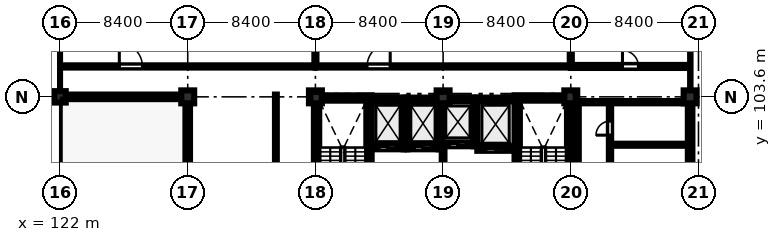
"""IFC4 building model, lengths in metres.
Left out: names, types, materials, properties, quantities, classifications, styles, units other than length and angle.
Written with IfcOpenShell. Run it as: python <this file> out.ifc"""

import sys

from ifc_helpers import new_model, si_unit, direction, frame, frame_2d, origin, origin_2d, place, context, subcontext, project, spatial, rectangle, extrude, element, fill, save


model = new_model("IFC4")
c1 = context("Model", 3, precision=1e-05, world=origin(), true_north=direction((0.0, 1.0)))
c2 = subcontext(c1, "Body", "Model", "MODEL_VIEW")
j1 = project(units=[si_unit("LENGTHUNIT", "METRE"), si_unit("PLANEANGLEUNIT", "RADIAN")], contexts=[c1])
p1 = place(None, origin())
s1 = spatial("IfcSite", under=j1, at=p1, CompositionType="ELEMENT")
p2 = place(p1, origin())
s2 = spatial("IfcBuilding", under=s1, at=p2, CompositionType="ELEMENT")
p3 = place(p2, frame((0.0, 0.0, 27.6)))
s3 = spatial("IfcBuildingStorey", under=s2, at=p3, CompositionType="ELEMENT", Elevation=27.6)
p4 = place(p3, frame((122.0, 103.6, 0.0), z_axis=(0.0, 0.0, 1.0), x_axis=(1.0, 0.0, 0.0)))
e1 = element("IfcColumn", 1, at=p4, inside=s3, PredefinedType="COLUMN", context=c2, shape_type="SweptSolid", body=[
    extrude(rectangle(XDim=0.75, YDim=0.75, at=origin_2d()), origin(), (0.0, 0.0, 1.0), 4.02),
])
for number, where, z_axis, x_axis in (
    (2, (130.4, 103.6, 0.0), (0.0, 0.0, 1.0), (1.0, 0.0, 0.0)),
    (3, (138.8, 103.6, 0.0), (0.0, 0.0, 1.0), (1.0, 0.0, 0.0)),
    (4, (147.2, 103.6, 0.0), (0.0, 0.0, 1.0), (1.0, 0.0, 0.0)),
    (5, (155.6, 103.6, 0.0), (0.0, 0.0, 1.0), (1.0, 0.0, 0.0)),
    (6, (163.45, 103.6, 0.0), (0.0, 0.0, 1.0), (1.0, 0.0, 0.0)),
):
    element("IfcColumn", number, at=place(p3, frame(where, z_axis=z_axis, x_axis=x_axis)), inside=s3, PredefinedType="COLUMN", context=c2, shape_type="SweptSolid", body=[
        extrude(rectangle(XDim=0.85, YDim=0.85, at=origin_2d()), origin(), (0.0, 0.0, 1.0), 4.02),
    ])
p5 = place(p3, frame((138.7, 103.525, 0.0), z_axis=(0.0, 0.0, 1.0), x_axis=(1.0, 0.0, 0.0)))
e7 = element("IfcWall", 7, at=p5, inside=s3, PredefinedType="SHEAR", context=c2, shape_type="SweptSolid", body=[
    extrude(rectangle(XDim=3.8, YDim=0.35, at=frame_2d((1.9, 0.0))), origin(), (0.0, 0.0, 1.0), 4.02),
])
p6 = place(p3, frame((138.875, 95.45, 0.0), z_axis=(0.0, 0.0, 1.0), x_axis=(0.0, 1.0, 0.0)))
e8 = element("IfcWall", 8, at=p6, inside=s3, PredefinedType="SHEAR", context=c2, shape_type="SweptSolid", body=[
    extrude(rectangle(XDim=7.9, YDim=0.35, at=frame_2d((3.95, 0.0))), origin(), (0.0, 0.0, 1.0), 4.02),
])
p7 = place(p3, frame((142.325, 95.45, 0.0), z_axis=(0.0, 0.0, 1.0), x_axis=(0.0, 1.0, 0.0)))
e9 = element("IfcWall", 9, at=p7, inside=s3, PredefinedType="SHEAR", context=c2, shape_type="SweptSolid", body=[
    extrude(rectangle(XDim=7.9, YDim=0.35, at=frame_2d((3.95, 0.0))), origin(), (0.0, 0.0, 1.0), 4.02),
])
p8 = place(p7, frame((0.22, 0.0, 0.0)))
e10 = element("IfcOpeningElement", 10, at=p8, cuts=e9, PredefinedType="OPENING", context=c2, shape_type="SweptSolid", body=[
    extrude(rectangle(XDim=1.15, YDim=2.15, at=frame_2d((0.575, 1.075))), frame((0.0, 0.185, 0.0), z_axis=(0.0, -1.0, 0.0), x_axis=(1.0, 0.0, 0.0)), (0.0, 0.0, 1.0), 0.37),
])
p9 = place(p3, frame((151.9, 103.525, 0.0), z_axis=(0.0, 0.0, 1.0), x_axis=(1.0, 0.0, 0.0)))
e11 = element("IfcWall", 11, at=p9, inside=s3, PredefinedType="SHEAR", context=c2, shape_type="SweptSolid", body=[
    extrude(rectangle(XDim=3.8, YDim=0.35, at=frame_2d((1.9, 0.0))), origin(), (0.0, 0.0, 1.0), 4.02),
])
p10 = place(p3, frame((152.075, 95.45, 0.0), z_axis=(0.0, 0.0, 1.0), x_axis=(0.0, 1.0, 0.0)))
e12 = element("IfcWall", 12, at=p10, inside=s3, PredefinedType="SHEAR", context=c2, shape_type="SweptSolid", body=[
    extrude(rectangle(XDim=7.9, YDim=0.35, at=frame_2d((3.95, 0.0))), origin(), (0.0, 0.0, 1.0), 4.02),
])
p11 = place(p10, frame((0.35, 0.0, 0.0)))
e13 = element("IfcOpeningElement", 13, at=p11, cuts=e12, PredefinedType="OPENING", context=c2, shape_type="SweptSolid", body=[
    extrude(rectangle(XDim=1.15, YDim=2.15, at=frame_2d((0.575, 1.075))), frame((0.0, 0.185, 0.0), z_axis=(0.0, -1.0, 0.0), x_axis=(1.0, 0.0, 0.0)), (0.0, 0.0, 1.0), 0.37),
])
p12 = place(p3, frame((155.525, 95.45, 0.0), z_axis=(0.0, 0.0, 1.0), x_axis=(0.0, 1.0, 0.0)))
e14 = element("IfcWall", 14, at=p12, inside=s3, PredefinedType="SHEAR", context=c2, shape_type="SweptSolid", body=[
    extrude(rectangle(XDim=7.9, YDim=0.35, at=frame_2d((3.95, 0.0))), origin(), (0.0, 0.0, 1.0), 4.02),
])
p13 = place(p3, frame((142.5, 100.275, 0.0), z_axis=(0.0, 0.0, 1.0), x_axis=(1.0, 0.0, 0.0)))
e15 = element("IfcWall", 15, at=p13, inside=s3, PredefinedType="SHEAR", context=c2, shape_type="SweptSolid", body=[
    extrude(rectangle(XDim=2.1, YDim=0.25, at=frame_2d((1.05, 0.0))), origin(), (0.0, 0.0, 1.0), 4.02),
])
p14 = place(p13, frame((0.5, 0.0, 0.0)))
e16 = element("IfcOpeningElement", 16, at=p14, cuts=e15, PredefinedType="OPENING", context=c2, shape_type="SweptSolid", body=[
    extrude(rectangle(XDim=1.1, YDim=2.15, at=frame_2d((0.55, 1.075))), frame((0.0, 0.135, 0.0), z_axis=(0.0, -1.0, 0.0), x_axis=(1.0, 0.0, 0.0)), (0.0, 0.0, 1.0), 0.27),
])
p15 = place(p3, frame((142.5, 103.425, 0.0), z_axis=(0.0, 0.0, 1.0), x_axis=(1.0, 0.0, 0.0)))
e17 = element("IfcWall", 17, at=p15, inside=s3, PredefinedType="SHEAR", context=c2, shape_type="SweptSolid", body=[
    extrude(rectangle(XDim=2.1, YDim=0.25, at=frame_2d((1.05, 0.0))), origin(), (0.0, 0.0, 1.0), 4.02),
])
p16 = place(p3, frame((144.725, 100.15, 0.0), z_axis=(0.0, 0.0, 1.0), x_axis=(0.0, 1.0, 0.0)))
e18 = element("IfcWall", 18, at=p16, inside=s3, PredefinedType="SHEAR", context=c2, shape_type="SweptSolid", body=[
    extrude(rectangle(XDim=3.4, YDim=0.25, at=frame_2d((1.7, 0.0))), origin(), (0.0, 0.0, 1.0), 4.02),
])
p17 = place(p3, frame((144.85, 100.275, 0.0), z_axis=(0.0, 0.0, 1.0), x_axis=(1.0, 0.0, 0.0)))
e19 = element("IfcWall", 19, at=p17, inside=s3, PredefinedType="SHEAR", context=c2, shape_type="SweptSolid", body=[
    extrude(rectangle(XDim=2.05, YDim=0.25, at=frame_2d((1.025, 0.0))), origin(), (0.0, 0.0, 1.0), 4.02),
])
p18 = place(p17, frame((0.465, 0.0, 0.0)))
e20 = element("IfcOpeningElement", 20, at=p18, cuts=e19, PredefinedType="OPENING", context=c2, shape_type="SweptSolid", body=[
    extrude(rectangle(XDim=1.12, YDim=2.15, at=frame_2d((0.56, 1.075))), frame((0.0, 0.135, 0.0), z_axis=(0.0, -1.0, 0.0), x_axis=(1.0, 0.0, 0.0)), (0.0, 0.0, 1.0), 0.27),
])
p19 = place(p3, frame((144.85, 103.425, 0.0), z_axis=(0.0, 0.0, 1.0), x_axis=(1.0, 0.0, 0.0)))
e21 = element("IfcWall", 21, at=p19, inside=s3, PredefinedType="SHEAR", context=c2, shape_type="SweptSolid", body=[
    extrude(rectangle(XDim=2.05, YDim=0.25, at=frame_2d((1.025, 0.0))), origin(), (0.0, 0.0, 1.0), 4.02),
])
p20 = place(p3, frame((147.025, 100.15, 0.0), z_axis=(0.0, 0.0, 1.0), x_axis=(0.0, 1.0, 0.0)))
e22 = element("IfcWall", 22, at=p20, inside=s3, PredefinedType="SHEAR", context=c2, shape_type="SweptSolid", body=[
    extrude(rectangle(XDim=3.4, YDim=0.25, at=frame_2d((1.7, 0.0))), origin(), (0.0, 0.0, 1.0), 4.02),
])
p21 = place(p3, frame((147.15, 100.475, 0.0), z_axis=(0.0, 0.0, 1.0), x_axis=(1.0, 0.0, 0.0)))
e23 = element("IfcWall", 23, at=p21, inside=s3, PredefinedType="SHEAR", context=c2, shape_type="SweptSolid", body=[
    extrude(rectangle(XDim=2.05, YDim=0.25, at=frame_2d((1.025, 0.0))), origin(), (0.0, 0.0, 1.0), 4.02),
])
p22 = place(p21, frame((0.495, 0.0, 0.0)))
e24 = element("IfcOpeningElement", 24, at=p22, cuts=e23, PredefinedType="OPENING", context=c2, shape_type="SweptSolid", body=[
    extrude(rectangle(XDim=1.06, YDim=2.15, at=frame_2d((0.53, 1.075))), frame((0.0, 0.135, 0.0), z_axis=(0.0, -1.0, 0.0), x_axis=(1.0, 0.0, 0.0)), (0.0, 0.0, 1.0), 0.27),
])
p23 = place(p3, frame((147.15, 103.425, 0.0), z_axis=(0.0, 0.0, 1.0), x_axis=(1.0, 0.0, 0.0)))
e25 = element("IfcWall", 25, at=p23, inside=s3, PredefinedType="SHEAR", context=c2, shape_type="SweptSolid", body=[
    extrude(rectangle(XDim=2.05, YDim=0.25, at=frame_2d((1.025, 0.0))), origin(), (0.0, 0.0, 1.0), 4.02),
])
p24 = place(p3, frame((149.325, 100.35, 0.0), z_axis=(0.0, 0.0, 1.0), x_axis=(0.0, 1.0, 0.0)))
e26 = element("IfcWall", 26, at=p24, inside=s3, PredefinedType="SHEAR", context=c2, shape_type="SweptSolid", body=[
    extrude(rectangle(XDim=3.2, YDim=0.25, at=frame_2d((1.6, 0.0))), origin(), (0.0, 0.0, 1.0), 4.02),
])
p25 = place(p3, frame((149.45, 100.175, 0.0), z_axis=(0.0, 0.0, 1.0), x_axis=(1.0, 0.0, 0.0)))
e27 = element("IfcWall", 27, at=p25, inside=s3, PredefinedType="SHEAR", context=c2, shape_type="SweptSolid", body=[
    extrude(rectangle(XDim=2.45, YDim=0.25, at=frame_2d((1.225, 0.0))), origin(), (0.0, 0.0, 1.0), 4.02),
])
p26 = place(p25, frame((0.575, 0.0, 0.0)))
e28 = element("IfcOpeningElement", 28, at=p26, cuts=e27, PredefinedType="OPENING", context=c2, shape_type="SweptSolid", body=[
    extrude(rectangle(XDim=1.3, YDim=2.25, at=frame_2d((0.65, 1.125))), frame((0.0, 0.135, 0.0), z_axis=(0.0, -1.0, 0.0), x_axis=(1.0, 0.0, 0.0)), (0.0, 0.0, 1.0), 0.27),
])
p27 = place(p3, frame((149.45, 103.425, 0.0), z_axis=(0.0, 0.0, 1.0), x_axis=(1.0, 0.0, 0.0)))
e29 = element("IfcWall", 29, at=p27, inside=s3, PredefinedType="SHEAR", context=c2, shape_type="SweptSolid", body=[
    extrude(rectangle(XDim=2.45, YDim=0.25, at=frame_2d((1.225, 0.0))), origin(), (0.0, 0.0, 1.0), 4.02),
])
p28 = place(p3, frame((163.45, 103.175, 0.0), z_axis=(0.0, 0.0, 1.0), x_axis=(0.0, -1.0, 0.0)))
e30 = element("IfcWall", 30, at=p28, inside=s3, PredefinedType="STANDARD", context=c2, shape_type="SweptSolid", body=[
    extrude(rectangle(XDim=7.55, YDim=0.3, at=frame_2d((3.775, 0.0))), origin(), (0.0, 0.0, 1.0), 3.32),
])
p29 = place(p28, frame((1.15, 0.0, 1.1)))
e31 = element("IfcOpeningElement", 31, at=p29, cuts=e30, PredefinedType="OPENING", context=c2, shape_type="SweptSolid", body=[
    extrude(rectangle(XDim=1.4, YDim=1.4, at=frame_2d((0.7, 0.7))), frame((0.0, 0.16, 0.0), z_axis=(0.0, -1.0, 0.0), x_axis=(1.0, 0.0, 0.0)), (0.0, 0.0, 1.0), 0.32),
])
p30 = place(p3, frame((130.4, 95.625, 0.0), z_axis=(0.0, 0.0, 1.0), x_axis=(0.0, 1.0, 0.0)))
e32 = element("IfcWall", 32, at=p30, inside=s3, PredefinedType="STANDARD", context=c2, shape_type="SweptSolid", body=[
    extrude(rectangle(XDim=7.55, YDim=0.3, at=frame_2d((3.775, 0.0))), origin(), (0.0, 0.0, 1.0), 3.32),
])
p31 = place(p30, frame((2.4, 0.0, 1.0)))
e33 = element("IfcOpeningElement", 33, at=p31, cuts=e32, PredefinedType="OPENING", context=c2, shape_type="SweptSolid", body=[
    extrude(rectangle(XDim=1.8, YDim=1.8, at=frame_2d((0.9, 0.9))), frame((0.0, 0.16, 0.0), z_axis=(0.0, -1.0, 0.0), x_axis=(1.0, 0.0, 0.0)), (0.0, 0.0, 1.0), 0.32),
])
p32 = place(p3, frame((129.975, 103.6, 0.0), z_axis=(0.0, 0.0, 1.0), x_axis=(-1.0, 0.0, 0.0)))
e34 = element("IfcWall", 34, at=p32, inside=s3, PredefinedType="STANDARD", context=c2, shape_type="SweptSolid", body=[
    extrude(rectangle(XDim=7.6, YDim=0.3, at=frame_2d((3.8, 0.0))), origin(), (0.0, 0.0, 1.0), 3.32),
])
p33 = place(p3, frame((147.2, 95.75, 0.0), z_axis=(0.0, 0.0, 1.0), x_axis=(0.0, 1.0, 0.0)))
e35 = element("IfcWall", 35, at=p33, inside=s3, PredefinedType="STANDARD", context=c2, shape_type="SweptSolid", body=[
    extrude(rectangle(XDim=4.5, YDim=0.18, at=frame_2d((2.25, 0.0))), origin(), (0.0, 0.0, 1.0), 3.32),
])
p34 = place(p3, frame((158.18, 94.68, 0.0), z_axis=(0.0, 0.0, 1.0), x_axis=(0.0, 1.0, 0.0)))
e36 = element("IfcWall", 36, at=p34, inside=s3, PredefinedType="PARTITIONING", context=c2, shape_type="SweptSolid", body=[
    extrude(rectangle(XDim=8.57, YDim=0.15, at=frame_2d((4.285, 0.0))), origin(), (0.0, 0.0, 1.0), 4.02),
])
p35 = place(p34, frame((0.8, 0.0, 0.0)))
e37 = element("IfcOpeningElement", 37, at=p35, cuts=e36, PredefinedType="OPENING", context=c2, shape_type="SweptSolid", body=[
    extrude(rectangle(XDim=1.0, YDim=2.12, at=frame_2d((0.5, 1.06))), frame((0.0, 0.085, 0.0), z_axis=(0.0, -1.0, 0.0), x_axis=(1.0, 0.0, 0.0)), (0.0, 0.0, 1.0), 0.17),
])
p36 = place(p34, frame((3.5, 0.0, 0.0)))
e38 = element("IfcOpeningElement", 38, at=p36, cuts=e36, PredefinedType="OPENING", context=c2, shape_type="SweptSolid", body=[
    extrude(rectangle(XDim=0.92, YDim=2.1, at=frame_2d((0.46, 1.05))), frame((0.0, 0.085, 0.0), z_axis=(0.0, -1.0, 0.0), x_axis=(1.0, 0.0, 0.0)), (0.0, 0.0, 1.0), 0.17),
])
p37 = place(p34, frame((6.4, 0.0, 0.0)))
e39 = element("IfcOpeningElement", 39, at=p37, cuts=e36, PredefinedType="OPENING", context=c2, shape_type="SweptSolid", body=[
    extrude(rectangle(XDim=0.92, YDim=2.1, at=frame_2d((0.46, 1.05))), frame((0.0, 0.085, 0.0), z_axis=(0.0, -1.0, 0.0), x_axis=(1.0, 0.0, 0.0)), (0.0, 0.0, 1.0), 0.17),
])
p38 = place(p3, frame((158.18, 100.45, 0.0), z_axis=(0.0, 0.0, 1.0), x_axis=(1.0, 0.0, 0.0)))
e40 = element("IfcWall", 40, at=p38, inside=s3, PredefinedType="PARTITIONING", context=c2, shape_type="SweptSolid", body=[
    extrude(rectangle(XDim=5.02, YDim=0.135, at=frame_2d((2.51, 0.0))), origin(), (0.0, 0.0, 1.0), 4.02),
])
p39 = place(p3, frame((156.05, 103.25, 0.0), z_axis=(0.0, 0.0, 1.0), x_axis=(1.0, 0.0, 0.0)))
e41 = element("IfcWall", 41, at=p39, inside=s3, PredefinedType="PARTITIONING", context=c2, shape_type="SweptSolid", body=[
    extrude(rectangle(XDim=7.15, YDim=0.15, at=frame_2d((3.575, 0.0))), origin(), (0.0, 0.0, 1.0), 4.02),
])
p40 = place(p3, frame((156.05, 94.68, 0.0), z_axis=(0.0, 0.0, 1.0), x_axis=(0.0, 1.0, 0.0)))
e42 = element("IfcWall", 42, at=p40, inside=s3, PredefinedType="PARTITIONING", context=c2, shape_type="SweptSolid", body=[
    extrude(rectangle(XDim=8.57, YDim=0.15, at=frame_2d((4.285, 0.0))), origin(), (0.0, 0.0, 1.0), 4.02),
])
p41 = place(p3, frame((136.2, 94.68, 0.0), z_axis=(0.0, 0.0, 1.0), x_axis=(0.0, 1.0, 0.0)))
e43 = element("IfcWall", 43, at=p41, inside=s3, PredefinedType="PARTITIONING", context=c2, shape_type="SweptSolid", body=[
    extrude(rectangle(XDim=9.07, YDim=0.12, at=frame_2d((4.535, 0.0))), origin(), (0.0, 0.0, 1.0), 4.02),
])
p42 = place(p3, frame((122.15, 105.6, 0.0), z_axis=(0.0, 0.0, 1.0), x_axis=(1.0, 0.0, 0.0)))
e44 = element("IfcWall", 44, at=p42, inside=s3, PredefinedType="PARTITIONING", context=c2, shape_type="SweptSolid", body=[
    extrude(rectangle(XDim=16.65, YDim=0.145, at=frame_2d((8.325, 0.0))), origin(), (0.0, 0.0, 1.0), 4.02),
])
p43 = place(p42, frame((3.75, 0.0, 0.0)))
e45 = element("IfcOpeningElement", 45, at=p43, cuts=e44, PredefinedType="OPENING", context=c2, shape_type="SweptSolid", body=[
    extrude(rectangle(XDim=1.52, YDim=2.22, at=frame_2d((0.76, 1.11))), frame((0.0, 0.083, 0.0), z_axis=(0.0, -1.0, 0.0), x_axis=(1.0, 0.0, 0.0)), (0.0, 0.0, 1.0), 0.165),
])
p44 = place(p3, frame((138.8, 105.6, 0.0), z_axis=(0.0, 0.0, 1.0), x_axis=(1.0, 0.0, 0.0)))
e46 = element("IfcWall", 46, at=p44, inside=s3, PredefinedType="PARTITIONING", context=c2, shape_type="SweptSolid", body=[
    extrude(rectangle(XDim=16.8, YDim=0.145, at=frame_2d((8.4, 0.0))), origin(), (0.0, 0.0, 1.0), 4.02),
])
p45 = place(p44, frame((3.4, 0.0, 0.0)))
e47 = element("IfcOpeningElement", 47, at=p45, cuts=e46, PredefinedType="OPENING", context=c2, shape_type="SweptSolid", body=[
    extrude(rectangle(XDim=1.52, YDim=2.22, at=frame_2d((0.76, 1.11))), frame((0.0, 0.083, 0.0), z_axis=(0.0, -1.0, 0.0), x_axis=(1.0, 0.0, 0.0)), (0.0, 0.0, 1.0), 0.165),
])
p46 = place(p3, frame((138.8, 105.6, 0.0), z_axis=(0.0, 0.0, 1.0), x_axis=(0.0, 1.0, 0.0)))
e48 = element("IfcWall", 48, at=p46, inside=s3, PredefinedType="PARTITIONING", context=c2, shape_type="SweptSolid", body=[
    extrude(rectangle(XDim=5.75, YDim=0.135, at=frame_2d((2.875, 0.0))), origin(), (0.0, 0.0, 1.0), 3.32),
])
p47 = place(p3, frame((155.6, 105.6, 0.0), z_axis=(0.0, 0.0, 1.0), x_axis=(1.0, 0.0, 0.0)))
e49 = element("IfcWall", 49, at=p47, inside=s3, PredefinedType="SOLIDWALL", context=c2, shape_type="SweptSolid", body=[
    extrude(rectangle(XDim=7.75, YDim=0.2, at=frame_2d((3.875, 0.0))), origin(), (0.0, 0.0, 1.0), 4.02),
])
p48 = place(p47, frame((3.4, 0.0, 0.0)))
e50 = element("IfcOpeningElement", 50, at=p48, cuts=e49, PredefinedType="OPENING", context=c2, shape_type="SweptSolid", body=[
    extrude(rectangle(XDim=1.05, YDim=2.15, at=frame_2d((0.525, 1.075))), frame((0.0, 0.11, 0.0), z_axis=(0.0, -1.0, 0.0), x_axis=(1.0, 0.0, 0.0)), (0.0, 0.0, 1.0), 0.22),
])
p49 = place(p3, frame((155.6, 105.6, 0.0), z_axis=(0.0, 0.0, 1.0), x_axis=(0.0, 1.0, 0.0)))
e51 = element("IfcWall", 51, at=p49, inside=s3, PredefinedType="PARTITIONING", context=c2, shape_type="SweptSolid", body=[
    extrude(rectangle(XDim=5.75, YDim=0.135, at=frame_2d((2.875, 0.0))), origin(), (0.0, 0.0, 1.0), 3.32),
])
p50 = place(p29, origin())
e52 = element("IfcWindow", 52, at=p50, inside=s3, PartitioningType="SINGLE_PANEL", PredefinedType="WINDOW", context=c2, shape_type="SweptSolid", body=[
    extrude(rectangle(XDim=1.4, YDim=1.4, at=frame_2d((0.7, 0.7))), frame((0.0, 0.03, 0.0), z_axis=(0.0, -1.0, 0.0), x_axis=(1.0, 0.0, 0.0)), (0.0, 0.0, 1.0), 0.06),
])
fill(e31, e52)
p51 = place(p31, origin())
e53 = element("IfcWindow", 53, at=p51, inside=s3, PartitioningType="DOUBLE_PANEL_VERTICAL", PredefinedType="WINDOW", context=c2, shape_type="SweptSolid", body=[
    extrude(rectangle(XDim=1.8, YDim=1.8, at=frame_2d((0.9, 0.9))), frame((0.0, 0.03, 0.0), z_axis=(0.0, -1.0, 0.0), x_axis=(1.0, 0.0, 0.0)), (0.0, 0.0, 1.0), 0.06),
])
fill(e33, e53)
p52 = place(p37, origin())
e54 = element("IfcDoor", 54, at=p52, inside=s3, OperationType="SINGLE_SWING_LEFT", PredefinedType="DOOR", context=c2, shape_type="SweptSolid", body=[
    extrude(rectangle(XDim=0.92, YDim=2.1, at=frame_2d((0.46, 1.05))), frame((0.0, 0.025, 0.0), z_axis=(0.0, -1.0, 0.0), x_axis=(1.0, 0.0, 0.0)), (0.0, 0.0, 1.0), 0.05),
])
fill(e39, e54)
p53 = place(p43, origin())
e55 = element("IfcDoor", 55, at=p53, inside=s3, OperationType="SINGLE_SWING_LEFT", PredefinedType="DOOR", context=c2, shape_type="SweptSolid", body=[
    extrude(rectangle(XDim=1.52, YDim=2.22, at=frame_2d((0.76, 1.11))), frame((0.0, 0.025, 0.0), z_axis=(0.0, -1.0, 0.0), x_axis=(1.0, 0.0, 0.0)), (0.0, 0.0, 1.0), 0.05),
])
fill(e45, e55)
p54 = place(p45, origin())
e56 = element("IfcDoor", 56, at=p54, inside=s3, OperationType="SINGLE_SWING_RIGHT", PredefinedType="DOOR", context=c2, shape_type="SweptSolid", body=[
    extrude(rectangle(XDim=1.52, YDim=2.22, at=frame_2d((0.76, 1.11))), frame((0.0, 0.025, 0.0), z_axis=(0.0, -1.0, 0.0), x_axis=(1.0, 0.0, 0.0)), (0.0, 0.0, 1.0), 0.05),
])
fill(e47, e56)
p55 = place(p48, origin())
e57 = element("IfcDoor", 57, at=p55, inside=s3, OperationType="SINGLE_SWING_LEFT", PredefinedType="DOOR", context=c2, shape_type="SweptSolid", body=[
    extrude(rectangle(XDim=1.05, YDim=2.15, at=frame_2d((0.525, 1.075))), frame((0.0, 0.025, 0.0), z_axis=(0.0, -1.0, 0.0), x_axis=(1.0, 0.0, 0.0)), (0.0, 0.0, 1.0), 0.05),
])
fill(e50, e57)
p56 = place(p14, origin())
e58 = element("IfcDoor", 58, at=p56, inside=s3, OperationType="SLIDING_TO_LEFT", PredefinedType="DOOR", context=c2, shape_type="SweptSolid", body=[
    extrude(rectangle(XDim=1.1, YDim=2.15, at=frame_2d((0.55, 1.075))), frame((0.0, 0.025, 0.0), z_axis=(0.0, -1.0, 0.0), x_axis=(1.0, 0.0, 0.0)), (0.0, 0.0, 1.0), 0.05),
])
fill(e16, e58)
p57 = place(p18, origin())
e59 = element("IfcDoor", 59, at=p57, inside=s3, OperationType="SLIDING_TO_LEFT", PredefinedType="DOOR", context=c2, shape_type="SweptSolid", body=[
    extrude(rectangle(XDim=1.12, YDim=2.15, at=frame_2d((0.56, 1.075))), frame((0.0, 0.025, 0.0), z_axis=(0.0, -1.0, 0.0), x_axis=(1.0, 0.0, 0.0)), (0.0, 0.0, 1.0), 0.05),
])
fill(e20, e59)
p58 = place(p22, origin())
e60 = element("IfcDoor", 60, at=p58, inside=s3, OperationType="SLIDING_TO_LEFT", PredefinedType="DOOR", context=c2, shape_type="SweptSolid", body=[
    extrude(rectangle(XDim=1.06, YDim=2.15, at=frame_2d((0.53, 1.075))), frame((0.0, 0.025, 0.0), z_axis=(0.0, -1.0, 0.0), x_axis=(1.0, 0.0, 0.0)), (0.0, 0.0, 1.0), 0.05),
])
fill(e24, e60)
p59 = place(p26, origin())
e61 = element("IfcDoor", 61, at=p59, inside=s3, OperationType="SLIDING_TO_LEFT", PredefinedType="DOOR", context=c2, shape_type="SweptSolid", body=[
    extrude(rectangle(XDim=1.3, YDim=2.25, at=frame_2d((0.65, 1.125))), frame((0.0, 0.025, 0.0), z_axis=(0.0, -1.0, 0.0), x_axis=(1.0, 0.0, 0.0)), (0.0, 0.0, 1.0), 0.05),
])
fill(e28, e61)
save(model, sys.argv[1])
